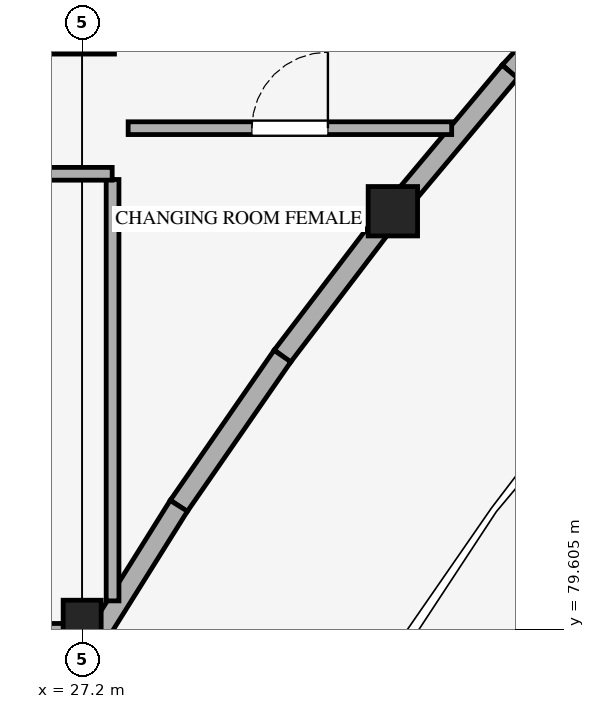
"""IFC4 building model, lengths in metres.
Left out: names, types, materials, properties, quantities, classifications, styles, units other than length and angle.
Written with IfcOpenShell. Run it as: python <this file> out.ifc"""

import sys

from ifc_helpers import new_model, si_unit, direction, frame, frame_2d, origin, origin_2d, place, context, subcontext, project, spatial, rectangle, circle, extrude, element, fill, save


model = new_model("IFC4")
c1 = context("Model", 3, precision=1e-05, world=origin(), true_north=direction((0.0, 1.0)))
c2 = subcontext(c1, "Body", "Model", "MODEL_VIEW")
j1 = project(units=[si_unit("LENGTHUNIT", "METRE"), si_unit("PLANEANGLEUNIT", "RADIAN")], contexts=[c1])
p1 = place(None, origin())
s1 = spatial("IfcSite", under=j1, at=p1, CompositionType="ELEMENT")
p2 = place(p1, origin())
s2 = spatial("IfcBuilding", under=s1, at=p2, CompositionType="ELEMENT")
p3 = place(p2, origin())
s3 = spatial("IfcBuildingStorey", under=s2, at=p3, CompositionType="ELEMENT", Elevation=0.0)
p4 = place(p3, frame((27.2, 79.615, 0.0), z_axis=(0.0, 0.0, 1.0), x_axis=(1.0, 0.0, 0.0)))
e1 = element("IfcColumn", 1, at=p4, inside=s3, PredefinedType="COLUMN", context=c2, shape_type="SweptSolid", body=[
    extrude(rectangle(XDim=0.5, YDim=0.75, at=origin_2d()), origin(), (0.0, 0.0, 1.0), 4.8),
])
p5 = place(p3, frame((27.2, 87.6, 0.0), z_axis=(0.0, 0.0, 1.0), x_axis=(1.0, 0.0, 0.0)))
e2 = element("IfcColumn", 2, at=p5, inside=s3, PredefinedType="COLUMN", context=c2, shape_type="SweptSolid", body=[
    extrude(rectangle(XDim=0.85, YDim=0.85, at=origin_2d()), origin(), (0.0, 0.0, 1.0), 4.8),
])
p6 = place(p3, frame((31.288, 85.107, 0.0), z_axis=(0.0, 0.0, 1.0), x_axis=(1.0, 0.0, 0.0)))
e3 = element("IfcColumn", 3, at=p6, inside=s3, PredefinedType="COLUMN", context=c2, shape_type="SweptSolid", body=[
    extrude(circle(Radius=0.325, at=origin_2d()), origin(), (0.0, 0.0, 1.0), 4.8),
])
p7 = place(p3, frame((34.449, 88.708, 0.0), z_axis=(0.0, 0.0, 1.0), x_axis=(-0.676946175491, -0.73603252339, 0.0)))
e4 = element("IfcWall", 4, at=p7, inside=s3, PredefinedType="STANDARD", context=c2, shape_type="SweptSolid", body=[
    extrude(rectangle(XDim=2.396, YDim=0.268, at=frame_2d((1.198, 0.0))), origin(), (0.0, 0.0, 1.0), 3.62),
])
p8 = place(p3, frame((32.827, 86.944, 0.0), z_axis=(0.0, 0.0, 1.0), x_axis=(-0.642326646104, -0.766431001268, 0.0)))
e5 = element("IfcWall", 5, at=p8, inside=s3, PredefinedType="STANDARD", context=c2, shape_type="SweptSolid", body=[
    extrude(rectangle(XDim=2.396, YDim=0.268, at=frame_2d((1.198, 0.0))), origin(), (0.0, 0.0, 1.0), 3.82),
])
p9 = place(p3, frame((31.288, 85.107, 0.0), z_axis=(0.0, 0.0, 1.0), x_axis=(-0.606337825748, -0.795207168647, 0.0)))
e6 = element("IfcWall", 6, at=p9, inside=s3, PredefinedType="STANDARD", context=c2, shape_type="SweptSolid", body=[
    extrude(rectangle(XDim=2.396, YDim=0.268, at=frame_2d((1.198, 0.0))), origin(), (0.0, 0.0, 1.0), 3.82),
])
p10 = place(p3, frame((29.835, 83.202, 0.0), z_axis=(0.0, 0.0, 1.0), x_axis=(-0.569029831822, -0.822316879613, 0.0)))
e7 = element("IfcWall", 7, at=p10, inside=s3, PredefinedType="STANDARD", context=c2, shape_type="SweptSolid", body=[
    extrude(rectangle(XDim=2.396, YDim=0.268, at=frame_2d((1.198, 0.0))), origin(), (0.0, 0.0, 1.0), 3.82),
])
p11 = place(p3, frame((28.471, 81.231, 0.0), z_axis=(0.0, 0.0, 1.0), x_axis=(-0.530584902819, -0.847631795593, 0.0)))
e8 = element("IfcWall", 8, at=p11, inside=s3, PredefinedType="STANDARD", context=c2, shape_type="SweptSolid", body=[
    extrude(rectangle(XDim=2.396, YDim=0.268, at=frame_2d((1.198, 0.0))), origin(), (0.0, 0.0, 1.0), 3.82),
])
p12 = place(p3, frame((27.6, 85.525, 0.0), z_axis=(0.0, 0.0, 1.0), x_axis=(0.0, -1.0, 0.0)))
e9 = element("IfcWall", 9, at=p12, inside=s3, PredefinedType="STANDARD", context=c2, shape_type="SweptSolid", body=[
    extrude(rectangle(XDim=5.544, YDim=0.168, at=frame_2d((2.772, 0.0))), origin(), (0.0, 0.0, 1.0), 3.82),
])
p13 = place(p3, frame((27.162, 79.6, 0.0), z_axis=(0.0, 0.0, 1.0), x_axis=(-1.0, 0.0, 0.0)))
e10 = element("IfcWall", 10, at=p13, inside=s3, PredefinedType="STANDARD", context=c2, shape_type="SweptSolid", body=[
    extrude(rectangle(XDim=6.757, YDim=0.168, at=frame_2d((3.378, 0.0))), origin(), (0.0, 0.0, 1.0), 3.67),
])
p14 = place(p3, frame((20.405, 85.6, 0.0), z_axis=(0.0, 0.0, 1.0), x_axis=(1.0, 0.0, 0.0)))
e11 = element("IfcWall", 11, at=p14, inside=s3, PredefinedType="STANDARD", context=c2, shape_type="SweptSolid", body=[
    extrude(rectangle(XDim=7.19, YDim=0.168, at=frame_2d((3.595, 0.0))), origin(), (0.0, 0.0, 1.0), 4.49),
])
p15 = place(p14, frame((3.095, 0.0, 0.0)))
e12 = element("IfcOpeningElement", 12, at=p15, cuts=e11, PredefinedType="OPENING", context=c2, shape_type="SweptSolid", body=[
    extrude(rectangle(XDim=1.0, YDim=2.1, at=frame_2d((0.5, 1.05))), frame((0.0, 0.094, 0.0), z_axis=(0.0, -1.0, 0.0), x_axis=(1.0, 0.0, 0.0)), (0.0, 0.0, 1.0), 0.188),
])
p16 = place(p3, frame((27.805, 86.2, 0.0), z_axis=(0.0, 0.0, 1.0), x_axis=(1.0, 0.0, 0.0)))
e13 = element("IfcWall", 13, at=p16, inside=s3, PredefinedType="STANDARD", context=c2, shape_type="SweptSolid", body=[
    extrude(rectangle(XDim=4.257, YDim=0.168, at=frame_2d((2.128, 0.0))), origin(), (0.0, 0.0, 1.0), 4.49),
])
p17 = place(p16, frame((1.628, 0.0, 0.0)))
e14 = element("IfcOpeningElement", 14, at=p17, cuts=e13, PredefinedType="OPENING", context=c2, shape_type="SweptSolid", body=[
    extrude(rectangle(XDim=1.0, YDim=2.1, at=frame_2d((0.5, 1.05))), frame((0.0, 0.094, 0.0), z_axis=(0.0, -1.0, 0.0), x_axis=(1.0, 0.0, 0.0)), (0.0, 0.0, 1.0), 0.188),
])
p18 = place(p17, origin())
e15 = element("IfcDoor", 15, at=p18, inside=s3, OperationType="SINGLE_SWING_RIGHT", PredefinedType="DOOR", context=c2, shape_type="SweptSolid", body=[
    extrude(rectangle(XDim=1.0, YDim=2.1, at=frame_2d((0.5, 1.05))), frame((0.0, 0.025, 0.0), z_axis=(0.0, -1.0, 0.0), x_axis=(1.0, 0.0, 0.0)), (0.0, 0.0, 1.0), 0.05),
])
fill(e14, e15)
save(model, sys.argv[1])
